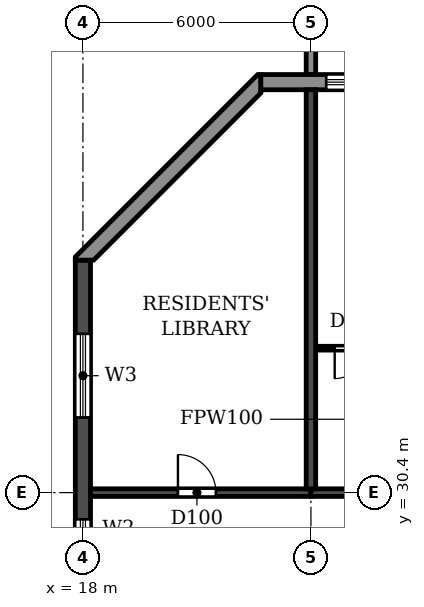
"""IFC4 building model, lengths in metres.
Left out: names, types, materials, properties, quantities, classifications, styles, units other than length and angle.
Written with IfcOpenShell. Run it as: python <this file> out.ifc"""

import sys

from ifc_helpers import new_model, si_unit, direction, frame, frame_2d, origin, place, context, subcontext, project, spatial, polyline, rectangle, outline, extrude, source, transform, mapped, element, fill, save


model = new_model("IFC4")
c1 = context("Model", 3, precision=1e-05, world=origin(), true_north=direction((0.0, 1.0)))
c2 = subcontext(c1, "Body", "Model", "MODEL_VIEW")
j1 = project(units=[si_unit("LENGTHUNIT", "METRE"), si_unit("PLANEANGLEUNIT", "RADIAN")], contexts=[c1])
p1 = place(None, origin())
s1 = spatial("IfcSite", under=j1, at=p1, CompositionType="ELEMENT")
p2 = place(p1, origin())
s2 = spatial("IfcBuilding", under=s1, at=p2, CompositionType="ELEMENT")
p3 = place(p2, frame((0.0, 0.0, 171.9)))
s3 = spatial("IfcBuildingStorey", under=s2, at=p3, CompositionType="ELEMENT", Elevation=171.9)
p4 = place(p3, frame((24.0, 30.5, 0.0), z_axis=(0.0, 0.0, 1.0), x_axis=(0.0, 1.0, 0.0)))
e1 = element("IfcWall", 1, at=p4, inside=s3, PredefinedType="SHEAR", context=c2, shape_type="SweptSolid", body=[
    extrude(rectangle(XDim=10.5, YDim=0.25, at=frame_2d((5.25, 0.0))), origin(), (0.0, 0.0, 1.0), 3.08),
])
p5 = place(p3, frame((18.0, 4.683, 0.0), z_axis=(0.0, 0.0, 1.0), x_axis=(0.0, 1.0, 0.0)))
e2 = element("IfcWall", 2, at=p5, inside=s3, PredefinedType="SHEAR", context=c2, shape_type="SweptSolid", body=[
    extrude(rectangle(XDim=31.834, YDim=0.4, at=frame_2d((15.917, 0.0))), origin(), (0.0, 0.0, 1.0), 3.08),
])
p6 = place(p5, frame((23.817, 0.0, 0.9)))
e3 = element("IfcOpeningElement", 3, at=p6, cuts=e2, PredefinedType="OPENING", context=c2, shape_type="SweptSolid", body=[
    extrude(rectangle(XDim=1.2, YDim=1.5, at=frame_2d((0.6, 0.75))), frame((0.0, 0.21, 0.0), z_axis=(0.0, -1.0, 0.0), x_axis=(1.0, 0.0, 0.0)), (0.0, 0.0, 1.0), 0.42),
])
p7 = place(p5, frame((8.017, 0.0, 0.9)))
e4 = element("IfcOpeningElement", 4, at=p7, cuts=e2, PredefinedType="OPENING", context=c2, shape_type="SweptSolid", body=[
    extrude(rectangle(XDim=1.2, YDim=1.5, at=frame_2d((0.6, 0.75))), frame((0.0, 0.21, 0.0), z_axis=(0.0, -1.0, 0.0), x_axis=(1.0, 0.0, 0.0)), (0.0, 0.0, 1.0), 0.42),
])
p8 = place(p5, frame((27.694, 0.0, 0.6)))
e5 = element("IfcOpeningElement", 5, at=p8, cuts=e2, PredefinedType="OPENING", context=c2, shape_type="SweptSolid", body=[
    extrude(rectangle(XDim=2.2, YDim=1.8, at=frame_2d((1.1, 0.9))), frame((0.0, 0.21, 0.0), z_axis=(0.0, -1.0, 0.0), x_axis=(1.0, 0.0, 0.0)), (0.0, 0.0, 1.0), 0.42),
])
p9 = place(p5, frame((2.541, 0.0, 0.6)))
e6 = element("IfcOpeningElement", 6, at=p9, cuts=e2, PredefinedType="OPENING", context=c2, shape_type="SweptSolid", body=[
    extrude(rectangle(XDim=2.2, YDim=1.8, at=frame_2d((1.1, 0.9))), frame((0.0, 0.21, 0.0), z_axis=(0.0, -1.0, 0.0), x_axis=(1.0, 0.0, 0.0)), (0.0, 0.0, 1.0), 0.42),
])
p10 = place(p5, frame((15.917, 0.0, 0.9)))
e7 = element("IfcOpeningElement", 7, at=p10, cuts=e2, PredefinedType="OPENING", context=c2, shape_type="SweptSolid", body=[
    extrude(rectangle(XDim=1.2, YDim=1.5, at=frame_2d((0.6, 0.75))), frame((0.0, 0.21, 0.0), z_axis=(0.0, -1.0, 0.0), x_axis=(1.0, 0.0, 0.0)), (0.0, 0.0, 1.0), 0.42),
])
p11 = place(p3, frame((18.2, 30.4, 0.0), z_axis=(0.0, 0.0, 1.0), x_axis=(1.0, 0.0, 0.0)))
e8 = element("IfcWall", 8, at=p11, inside=s3, PredefinedType="SHEAR", context=c2, shape_type="SweptSolid", body=[
    extrude(rectangle(XDim=5.8, YDim=0.2, at=frame_2d((2.9, 0.0))), origin(), (0.0, 0.0, 1.0), 2.48),
])
p12 = place(p11, frame((2.3, 0.0, 0.0)))
e9 = element("IfcOpeningElement", 9, at=p12, cuts=e8, PredefinedType="OPENING", context=c2, shape_type="SweptSolid", body=[
    extrude(rectangle(XDim=1.0, YDim=2.1, at=frame_2d((0.5, 1.05))), frame((0.0, 0.11, 0.0), z_axis=(0.0, -1.0, 0.0), x_axis=(1.0, 0.0, 0.0)), (0.0, 0.0, 1.0), 0.22),
])
p13 = place(p3, frame((24.0, 30.4, 0.0), z_axis=(0.0, 0.0, 1.0), x_axis=(1.0, 0.0, 0.0)))
e10 = element("IfcWall", 10, at=p13, inside=s3, PredefinedType="SHEAR", context=c2, shape_type="SweptSolid", body=[
    extrude(rectangle(XDim=6.0, YDim=0.2, at=frame_2d((3.0, 0.0))), origin(), (0.0, 0.0, 1.0), 2.48),
])
p14 = place(p13, frame((2.45, 0.0, 0.0)))
e11 = element("IfcOpeningElement", 11, at=p14, cuts=e10, PredefinedType="OPENING", context=c2, shape_type="SweptSolid", body=[
    extrude(rectangle(XDim=1.0, YDim=2.1, at=frame_2d((0.5, 1.05))), frame((0.0, 0.11, 0.0), z_axis=(0.0, -1.0, 0.0), x_axis=(1.0, 0.0, 0.0)), (0.0, 0.0, 1.0), 0.22),
])
p15 = place(p3, frame((79.317, 41.2, 0.0), z_axis=(0.0, 0.0, 1.0), x_axis=(-1.0, 0.0, 0.0)))
e12 = element("IfcWall", 12, at=p15, inside=s3, PredefinedType="STANDARD", context=c2, shape_type="SweptSolid", body=[
    extrude(rectangle(XDim=56.634, YDim=0.4, at=frame_2d((28.317, 0.0))), origin(), (0.0, 0.0, 1.0), 3.08),
])
p16 = place(p15, frame((52.717, 0.0, 0.9)))
e13 = element("IfcOpeningElement", 13, at=p16, cuts=e12, PredefinedType="OPENING", context=c2, shape_type="SweptSolid", body=[
    extrude(rectangle(XDim=2.2, YDim=1.5, at=frame_2d((1.1, 0.75))), frame((0.0, 0.21, 0.0), z_axis=(0.0, -1.0, 0.0), x_axis=(1.0, 0.0, 0.0)), (0.0, 0.0, 1.0), 0.42),
])
p17 = place(p15, frame((49.917, 0.0, 0.0)))
e14 = element("IfcOpeningElement", 14, at=p17, cuts=e12, PredefinedType="OPENING", context=c2, shape_type="SweptSolid", body=[
    extrude(rectangle(XDim=1.8, YDim=2.4, at=frame_2d((0.9, 1.2))), frame((0.0, 0.21, 0.0), z_axis=(0.0, -1.0, 0.0), x_axis=(1.0, 0.0, 0.0)), (0.0, 0.0, 1.0), 0.42),
])
p18 = place(p15, frame((46.717, 0.0, 0.9)))
e15 = element("IfcOpeningElement", 15, at=p18, cuts=e12, PredefinedType="OPENING", context=c2, shape_type="SweptSolid", body=[
    extrude(rectangle(XDim=2.2, YDim=1.5, at=frame_2d((1.1, 0.75))), frame((0.0, 0.21, 0.0), z_axis=(0.0, -1.0, 0.0), x_axis=(1.0, 0.0, 0.0)), (0.0, 0.0, 1.0), 0.42),
])
p19 = place(p15, frame((43.717, 0.0, 0.9)))
e16 = element("IfcOpeningElement", 16, at=p19, cuts=e12, PredefinedType="OPENING", context=c2, shape_type="SweptSolid", body=[
    extrude(rectangle(XDim=2.2, YDim=1.5, at=frame_2d((1.1, 0.75))), frame((0.0, 0.21, 0.0), z_axis=(0.0, -1.0, 0.0), x_axis=(1.0, 0.0, 0.0)), (0.0, 0.0, 1.0), 0.42),
])
p20 = place(p15, frame((40.917, 0.0, 0.0)))
e17 = element("IfcOpeningElement", 17, at=p20, cuts=e12, PredefinedType="OPENING", context=c2, shape_type="SweptSolid", body=[
    extrude(rectangle(XDim=1.8, YDim=2.4, at=frame_2d((0.9, 1.2))), frame((0.0, 0.21, 0.0), z_axis=(0.0, -1.0, 0.0), x_axis=(1.0, 0.0, 0.0)), (0.0, 0.0, 1.0), 0.42),
])
p21 = place(p15, frame((37.717, 0.0, 0.9)))
e18 = element("IfcOpeningElement", 18, at=p21, cuts=e12, PredefinedType="OPENING", context=c2, shape_type="SweptSolid", body=[
    extrude(rectangle(XDim=2.2, YDim=1.5, at=frame_2d((1.1, 0.75))), frame((0.0, 0.21, 0.0), z_axis=(0.0, -1.0, 0.0), x_axis=(1.0, 0.0, 0.0)), (0.0, 0.0, 1.0), 0.42),
])
p22 = place(p15, frame((34.717, 0.0, 0.9)))
e19 = element("IfcOpeningElement", 19, at=p22, cuts=e12, PredefinedType="OPENING", context=c2, shape_type="SweptSolid", body=[
    extrude(rectangle(XDim=2.2, YDim=1.5, at=frame_2d((1.1, 0.75))), frame((0.0, 0.21, 0.0), z_axis=(0.0, -1.0, 0.0), x_axis=(1.0, 0.0, 0.0)), (0.0, 0.0, 1.0), 0.42),
])
p23 = place(p15, frame((31.717, 0.0, 0.9)))
e20 = element("IfcOpeningElement", 20, at=p23, cuts=e12, PredefinedType="OPENING", context=c2, shape_type="SweptSolid", body=[
    extrude(rectangle(XDim=2.2, YDim=1.5, at=frame_2d((1.1, 0.75))), frame((0.0, 0.21, 0.0), z_axis=(0.0, -1.0, 0.0), x_axis=(1.0, 0.0, 0.0)), (0.0, 0.0, 1.0), 0.42),
])
p24 = place(p15, frame((28.717, 0.0, 0.9)))
e21 = element("IfcOpeningElement", 21, at=p24, cuts=e12, PredefinedType="OPENING", context=c2, shape_type="SweptSolid", body=[
    extrude(rectangle(XDim=2.2, YDim=1.5, at=frame_2d((1.1, 0.75))), frame((0.0, 0.21, 0.0), z_axis=(0.0, -1.0, 0.0), x_axis=(1.0, 0.0, 0.0)), (0.0, 0.0, 1.0), 0.42),
])
p25 = place(p15, frame((25.917, 0.0, 0.0)))
e22 = element("IfcOpeningElement", 22, at=p25, cuts=e12, PredefinedType="OPENING", context=c2, shape_type="SweptSolid", body=[
    extrude(rectangle(XDim=1.8, YDim=2.4, at=frame_2d((0.9, 1.2))), frame((0.0, 0.21, 0.0), z_axis=(0.0, -1.0, 0.0), x_axis=(1.0, 0.0, 0.0)), (0.0, 0.0, 1.0), 0.42),
])
p26 = place(p15, frame((22.717, 0.0, 0.9)))
e23 = element("IfcOpeningElement", 23, at=p26, cuts=e12, PredefinedType="OPENING", context=c2, shape_type="SweptSolid", body=[
    extrude(rectangle(XDim=2.2, YDim=1.5, at=frame_2d((1.1, 0.75))), frame((0.0, 0.21, 0.0), z_axis=(0.0, -1.0, 0.0), x_axis=(1.0, 0.0, 0.0)), (0.0, 0.0, 1.0), 0.42),
])
p27 = place(p15, frame((19.917, 0.0, 0.0)))
e24 = element("IfcOpeningElement", 24, at=p27, cuts=e12, PredefinedType="OPENING", context=c2, shape_type="SweptSolid", body=[
    extrude(rectangle(XDim=1.8, YDim=2.4, at=frame_2d((0.9, 1.2))), frame((0.0, 0.21, 0.0), z_axis=(0.0, -1.0, 0.0), x_axis=(1.0, 0.0, 0.0)), (0.0, 0.0, 1.0), 0.42),
])
p28 = place(p15, frame((16.717, 0.0, 0.9)))
e25 = element("IfcOpeningElement", 25, at=p28, cuts=e12, PredefinedType="OPENING", context=c2, shape_type="SweptSolid", body=[
    extrude(rectangle(XDim=2.2, YDim=1.5, at=frame_2d((1.1, 0.75))), frame((0.0, 0.21, 0.0), z_axis=(0.0, -1.0, 0.0), x_axis=(1.0, 0.0, 0.0)), (0.0, 0.0, 1.0), 0.42),
])
p29 = place(p15, frame((13.717, 0.0, 0.9)))
e26 = element("IfcOpeningElement", 26, at=p29, cuts=e12, PredefinedType="OPENING", context=c2, shape_type="SweptSolid", body=[
    extrude(rectangle(XDim=2.2, YDim=1.5, at=frame_2d((1.1, 0.75))), frame((0.0, 0.21, 0.0), z_axis=(0.0, -1.0, 0.0), x_axis=(1.0, 0.0, 0.0)), (0.0, 0.0, 1.0), 0.42),
])
p30 = place(p15, frame((10.917, 0.0, 0.0)))
e27 = element("IfcOpeningElement", 27, at=p30, cuts=e12, PredefinedType="OPENING", context=c2, shape_type="SweptSolid", body=[
    extrude(rectangle(XDim=1.8, YDim=2.4, at=frame_2d((0.9, 1.2))), frame((0.0, 0.21, 0.0), z_axis=(0.0, -1.0, 0.0), x_axis=(1.0, 0.0, 0.0)), (0.0, 0.0, 1.0), 0.42),
])
p31 = place(p15, frame((7.717, 0.0, 0.9)))
e28 = element("IfcOpeningElement", 28, at=p31, cuts=e12, PredefinedType="OPENING", context=c2, shape_type="SweptSolid", body=[
    extrude(rectangle(XDim=2.2, YDim=1.5, at=frame_2d((1.1, 0.75))), frame((0.0, 0.21, 0.0), z_axis=(0.0, -1.0, 0.0), x_axis=(1.0, 0.0, 0.0)), (0.0, 0.0, 1.0), 0.42),
])
p32 = place(p15, frame((4.717, 0.0, 0.9)))
e29 = element("IfcOpeningElement", 29, at=p32, cuts=e12, PredefinedType="OPENING", context=c2, shape_type="SweptSolid", body=[
    extrude(rectangle(XDim=2.2, YDim=1.5, at=frame_2d((1.1, 0.75))), frame((0.0, 0.21, 0.0), z_axis=(0.0, -1.0, 0.0), x_axis=(1.0, 0.0, 0.0)), (0.0, 0.0, 1.0), 0.42),
])
p33 = place(p15, frame((1.917, 0.0, 0.0)))
e30 = element("IfcOpeningElement", 30, at=p33, cuts=e12, PredefinedType="OPENING", context=c2, shape_type="SweptSolid", body=[
    extrude(rectangle(XDim=1.8, YDim=2.4, at=frame_2d((0.9, 1.2))), frame((0.0, 0.21, 0.0), z_axis=(0.0, -1.0, 0.0), x_axis=(1.0, 0.0, 0.0)), (0.0, 0.0, 1.0), 0.42),
])
p34 = place(p3, origin())
e31 = element("IfcWall", 31, at=p34, inside=s3, PredefinedType="STANDARD", context=c2, shape_type="SweptSolid", body=[
    extrude(outline(polyline([(22.683, 41.4), (22.6, 41.4), (17.8, 36.6), (17.8, 36.517), (18.283, 36.517), (22.683, 40.917), (22.683, 41.4)])), origin(), (0.0, 0.0, 1.0), 3.08),
])
m1 = source(origin(), c2, "Body", "SweptSolid", [
    extrude(outline(polyline([(0.0, 0.0), (0.25, 0.0), (0.25, 3.1), (0.0, 3.1), (0.0, 0.0)])), origin(), (0.0, 0.0, 1.0), 3.1),
])
p35 = place(p3, frame((23.875, 41.4, 0.0)))
e32 = element("IfcWall", 32, at=p35, inside=s3, PredefinedType="STANDARD", context=c2, shape_type="MappedRepresentation", body=[
    mapped(m1, transform((0.0, 0.0, 0.0))),
])
p36 = place(p3, frame((24.135, 34.2, 0.0), z_axis=(0.0, 0.0, 1.0), x_axis=(1.0, 0.0, 0.0)))
e33 = element("IfcWall", 33, at=p36, inside=s3, PredefinedType="PARTITIONING", context=c2, shape_type="SweptSolid", body=[
    extrude(rectangle(XDim=1.965, YDim=0.1, at=frame_2d((0.982, 0.0))), origin(), (0.0, 0.0, 1.0), 3.08),
])
p37 = place(p36, frame((0.49, 0.0, 0.0)))
e34 = element("IfcOpeningElement", 34, at=p37, cuts=e33, PredefinedType="OPENING", context=c2, shape_type="SweptSolid", body=[
    extrude(rectangle(XDim=0.8, YDim=2.1, at=frame_2d((0.4, 1.05))), frame((0.0, 0.06, 0.0), z_axis=(0.0, -1.0, 0.0), x_axis=(1.0, 0.0, 0.0)), (0.0, 0.0, 1.0), 0.12),
])
p38 = place(p16, origin())
e35 = element("IfcWindow", 35, at=p38, inside=s3, PartitioningType="DOUBLE_PANEL_HORIZONTAL", PredefinedType="WINDOW", context=c2, shape_type="SweptSolid", body=[
    extrude(rectangle(XDim=2.2, YDim=1.5, at=frame_2d((1.1, 0.75))), frame((0.0, 0.03, 0.0), z_axis=(0.0, -1.0, 0.0), x_axis=(1.0, 0.0, 0.0)), (0.0, 0.0, 1.0), 0.06),
])
fill(e13, e35)
p39 = place(p6, origin())
e36 = element("IfcWindow", 36, at=p39, inside=s3, PartitioningType="SINGLE_PANEL", PredefinedType="WINDOW", context=c2, shape_type="SweptSolid", body=[
    extrude(rectangle(XDim=1.2, YDim=1.5, at=frame_2d((0.6, 0.75))), frame((0.0, 0.03, 0.0), z_axis=(0.0, -1.0, 0.0), x_axis=(1.0, 0.0, 0.0)), (0.0, 0.0, 1.0), 0.06),
])
fill(e3, e36)
p40 = place(p8, origin())
e37 = element("IfcWindow", 37, at=p40, inside=s3, PartitioningType="DOUBLE_PANEL_HORIZONTAL", PredefinedType="WINDOW", context=c2, shape_type="SweptSolid", body=[
    extrude(rectangle(XDim=2.2, YDim=1.8, at=frame_2d((1.1, 0.9))), frame((0.0, 0.03, 0.0), z_axis=(0.0, -1.0, 0.0), x_axis=(1.0, 0.0, 0.0)), (0.0, 0.0, 1.0), 0.06),
])
fill(e5, e37)
p41 = place(p12, origin())
e38 = element("IfcDoor", 38, at=p41, inside=s3, OperationType="SINGLE_SWING_LEFT", PredefinedType="DOOR", context=c2, shape_type="SweptSolid", body=[
    extrude(rectangle(XDim=1.0, YDim=2.1, at=frame_2d((0.5, 1.05))), frame((0.0, 0.025, 0.0), z_axis=(0.0, -1.0, 0.0), x_axis=(1.0, 0.0, 0.0)), (0.0, 0.0, 1.0), 0.05),
])
fill(e9, e38)
p42 = place(p37, frame((0.8, 0.0, 0.0), z_axis=(0.0, 0.0, 1.0), x_axis=(-1.0, 0.0, 0.0)))
e39 = element("IfcDoor", 39, at=p42, inside=s3, OperationType="SINGLE_SWING_RIGHT", PredefinedType="DOOR", context=c2, shape_type="SweptSolid", body=[
    extrude(rectangle(XDim=0.8, YDim=2.1, at=frame_2d((0.4, 1.05))), frame((0.0, 0.025, 0.0), z_axis=(0.0, -1.0, 0.0), x_axis=(1.0, 0.0, 0.0)), (0.0, 0.0, 1.0), 0.05),
])
fill(e34, e39)
save(model, sys.argv[1])
